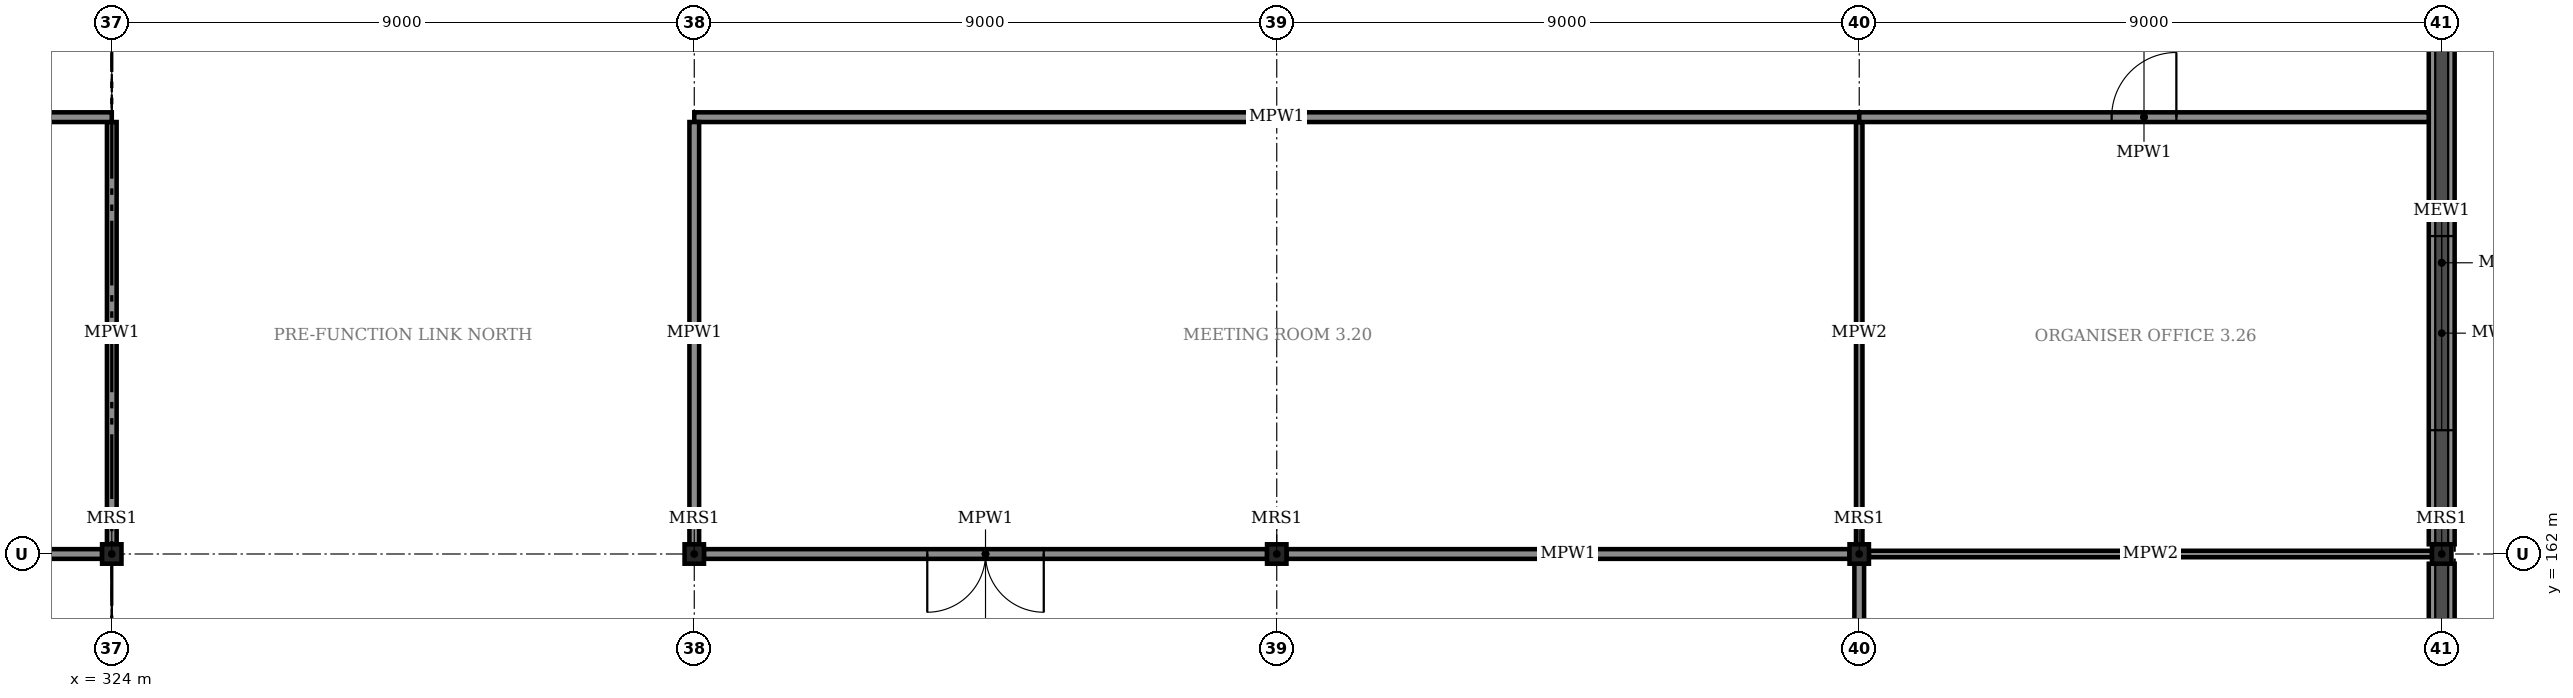
"""IFC4 building model, lengths in metres.
Left out: names, types, materials, properties, quantities, classifications, styles, units other than length and angle.
Written with IfcOpenShell. Run it as: python <this file> out.ifc"""

import sys

from ifc_helpers import new_model, si_unit, direction, frame, frame_2d, origin, origin_2d, place, context, subcontext, project, spatial, rectangle, hollow_rectangle, extrude, element, fill, save


model = new_model("IFC4")
c1 = context("Model", 3, precision=1e-05, world=origin(), true_north=direction((0.0, 1.0)))
c2 = subcontext(c1, "Body", "Model", "MODEL_VIEW")
j1 = project(units=[si_unit("LENGTHUNIT", "METRE"), si_unit("PLANEANGLEUNIT", "RADIAN")], contexts=[c1])
p1 = place(None, origin())
s1 = spatial("IfcSite", under=j1, at=p1, CompositionType="ELEMENT")
p2 = place(p1, origin())
s2 = spatial("IfcBuilding", under=s1, at=p2, CompositionType="ELEMENT")
p3 = place(p2, frame((0.0, 0.0, 17.0)))
s3 = spatial("IfcBuildingStorey", under=s2, at=p3, CompositionType="ELEMENT", Elevation=17.0)
for number, where, z_axis, x_axis in (
    (1, (324.0, 162.0, 0.0), (0.0, 0.0, 1.0), (1.0, 0.0, 0.0)),
    (2, (333.0, 162.0, 0.0), (0.0, 0.0, 1.0), (1.0, 0.0, 0.0)),
    (3, (342.0, 162.0, 0.0), (0.0, 0.0, 1.0), (1.0, 0.0, 0.0)),
    (4, (351.0, 162.0, 0.0), (0.0, 0.0, 1.0), (1.0, 0.0, 0.0)),
    (5, (360.0, 162.0, 0.0), (0.0, 0.0, 1.0), (1.0, 0.0, 0.0)),
):
    element("IfcColumn", number, at=place(p3, frame(where, z_axis=z_axis, x_axis=x_axis)), inside=s3, PredefinedType="COLUMN", context=c2, shape_type="SweptSolid", body=[
        extrude(hollow_rectangle(XDim=0.3, YDim=0.3, WallThickness=0.012, InnerFilletRadius=0.024, OuterFilletRadius=0.036, at=origin_2d()), origin(), (0.0, 0.0, 1.0), 3.1),
    ])
p4 = place(p3, frame((360.0, 153.15, 0.0), z_axis=(0.0, 0.0, 1.0), x_axis=(0.0, 1.0, 0.0)))
e6 = element("IfcWall", 6, at=p4, inside=s3, PredefinedType="STANDARD", context=c2, shape_type="SweptSolid", body=[
    extrude(rectangle(XDim=8.7, YDim=0.4, at=frame_2d((4.35, 0.0))), origin(), (0.0, 0.0, 1.0), 3.3),
])
p5 = place(p4, frame((2.85, 0.0, 0.9)))
e7 = element("IfcOpeningElement", 7, at=p5, cuts=e6, PredefinedType="OPENING", context=c2, shape_type="SweptSolid", body=[
    extrude(rectangle(XDim=3.0, YDim=2.1, at=frame_2d((1.5, 1.05))), frame((0.0, 0.21, 0.0), z_axis=(0.0, -1.0, 0.0), x_axis=(1.0, 0.0, 0.0)), (0.0, 0.0, 1.0), 0.42),
])
p6 = place(p3, frame((360.0, 162.15, 0.0), z_axis=(0.0, 0.0, 1.0), x_axis=(0.0, 1.0, 0.0)))
e8 = element("IfcWall", 8, at=p6, inside=s3, PredefinedType="STANDARD", context=c2, shape_type="SweptSolid", body=[
    extrude(rectangle(XDim=8.7, YDim=0.4, at=frame_2d((4.35, 0.0))), origin(), (0.0, 0.0, 1.0), 3.3),
])
p7 = place(p6, frame((1.763, 0.0, 0.9)))
e9 = element("IfcOpeningElement", 9, at=p7, cuts=e8, PredefinedType="OPENING", context=c2, shape_type="SweptSolid", body=[
    extrude(rectangle(XDim=3.0, YDim=2.1, at=frame_2d((1.5, 1.05))), frame((0.0, 0.21, 0.0), z_axis=(0.0, -1.0, 0.0), x_axis=(1.0, 0.0, 0.0)), (0.0, 0.0, 1.0), 0.42),
])
p8 = place(p3, frame((315.15, 162.0, 0.0), z_axis=(0.0, 0.0, 1.0), x_axis=(1.0, 0.0, 0.0)))
e10 = element("IfcWall", 10, at=p8, inside=s3, PredefinedType="PARTITIONING", context=c2, shape_type="SweptSolid", body=[
    extrude(rectangle(XDim=8.7, YDim=0.15, at=frame_2d((4.35, 0.0))), origin(), (0.0, 0.0, 1.0), 3.0),
])
p9 = place(p3, frame((297.0, 168.75, 0.0), z_axis=(0.0, 0.0, 1.0), x_axis=(1.0, 0.0, 0.0)))
e11 = element("IfcWall", 11, at=p9, inside=s3, PredefinedType="PARTITIONING", context=c2, shape_type="SweptSolid", body=[
    extrude(rectangle(XDim=27.0, YDim=0.15, at=frame_2d((13.5, 0.0))), origin(), (0.0, 0.0, 1.0), 3.0),
])
p10 = place(p3, frame((324.0, 162.15, 0.0), z_axis=(0.0, 0.0, 1.0), x_axis=(0.0, 1.0, 0.0)))
e12 = element("IfcWall", 12, at=p10, inside=s3, PredefinedType="PARTITIONING", context=c2, shape_type="SweptSolid", body=[
    extrude(rectangle(XDim=6.525, YDim=0.15, at=frame_2d((3.263, 0.0))), origin(), (0.0, 0.0, 1.0), 3.0),
])
p11 = place(p3, frame((333.15, 162.0, 0.0), z_axis=(0.0, 0.0, 1.0), x_axis=(1.0, 0.0, 0.0)))
e13 = element("IfcWall", 13, at=p11, inside=s3, PredefinedType="PARTITIONING", context=c2, shape_type="SweptSolid", body=[
    extrude(rectangle(XDim=8.7, YDim=0.15, at=frame_2d((4.35, 0.0))), origin(), (0.0, 0.0, 1.0), 3.0),
])
p12 = place(p11, frame((3.45, 0.0, 0.0)))
e14 = element("IfcOpeningElement", 14, at=p12, cuts=e13, PredefinedType="OPENING", context=c2, shape_type="SweptSolid", body=[
    extrude(rectangle(XDim=1.8, YDim=2.4, at=frame_2d((0.9, 1.2))), frame((0.0, 0.085, 0.0), z_axis=(0.0, -1.0, 0.0), x_axis=(1.0, 0.0, 0.0)), (0.0, 0.0, 1.0), 0.17),
])
p13 = place(p3, frame((342.15, 162.0, 0.0), z_axis=(0.0, 0.0, 1.0), x_axis=(1.0, 0.0, 0.0)))
e15 = element("IfcWall", 15, at=p13, inside=s3, PredefinedType="PARTITIONING", context=c2, shape_type="SweptSolid", body=[
    extrude(rectangle(XDim=8.7, YDim=0.15, at=frame_2d((4.35, 0.0))), origin(), (0.0, 0.0, 1.0), 3.0),
])
p14 = place(p3, frame((333.0, 168.75, 0.0), z_axis=(0.0, 0.0, 1.0), x_axis=(1.0, 0.0, 0.0)))
e16 = element("IfcWall", 16, at=p14, inside=s3, PredefinedType="PARTITIONING", context=c2, shape_type="SweptSolid", body=[
    extrude(rectangle(XDim=18.0, YDim=0.15, at=frame_2d((9.0, 0.0))), origin(), (0.0, 0.0, 1.0), 3.0),
])
p15 = place(p3, frame((333.0, 162.15, 0.0), z_axis=(0.0, 0.0, 1.0), x_axis=(0.0, 1.0, 0.0)))
e17 = element("IfcWall", 17, at=p15, inside=s3, PredefinedType="PARTITIONING", context=c2, shape_type="SweptSolid", body=[
    extrude(rectangle(XDim=6.525, YDim=0.15, at=frame_2d((3.263, 0.0))), origin(), (0.0, 0.0, 1.0), 3.0),
])
p16 = place(p3, frame((351.0, 162.15, 0.0), z_axis=(0.0, 0.0, 1.0), x_axis=(0.0, 1.0, 0.0)))
e18 = element("IfcWall", 18, at=p16, inside=s3, PredefinedType="PARTITIONING", context=c2, shape_type="SweptSolid", body=[
    extrude(rectangle(XDim=6.525, YDim=0.1, at=frame_2d((3.263, 0.0))), origin(), (0.0, 0.0, 1.0), 3.0),
])
p17 = place(p3, frame((351.15, 162.0, 0.0), z_axis=(0.0, 0.0, 1.0), x_axis=(1.0, 0.0, 0.0)))
e19 = element("IfcWall", 19, at=p17, inside=s3, PredefinedType="PARTITIONING", context=c2, shape_type="SweptSolid", body=[
    extrude(rectangle(XDim=8.7, YDim=0.1, at=frame_2d((4.35, 0.0))), origin(), (0.0, 0.0, 1.0), 3.0),
])
p18 = place(p3, frame((351.0, 153.15, 0.0), z_axis=(0.0, 0.0, 1.0), x_axis=(0.0, 1.0, 0.0)))
e20 = element("IfcWall", 20, at=p18, inside=s3, PredefinedType="PARTITIONING", context=c2, shape_type="SweptSolid", body=[
    extrude(rectangle(XDim=8.7, YDim=0.15, at=frame_2d((4.35, 0.0))), origin(), (0.0, 0.0, 1.0), 3.0),
])
p19 = place(p18, frame((3.85, 0.0, 0.0)))
e21 = element("IfcOpeningElement", 21, at=p19, cuts=e20, PredefinedType="OPENING", context=c2, shape_type="SweptSolid", body=[
    extrude(rectangle(XDim=1.0, YDim=2.4, at=frame_2d((0.5, 1.2))), frame((0.0, 0.085, 0.0), z_axis=(0.0, -1.0, 0.0), x_axis=(1.0, 0.0, 0.0)), (0.0, 0.0, 1.0), 0.17),
])
p20 = place(p3, frame((351.0, 168.75, 0.0), z_axis=(0.0, 0.0, 1.0), x_axis=(1.0, 0.0, 0.0)))
e22 = element("IfcWall", 22, at=p20, inside=s3, PredefinedType="PARTITIONING", context=c2, shape_type="SweptSolid", body=[
    extrude(rectangle(XDim=8.8, YDim=0.15, at=frame_2d((4.4, 0.0))), origin(), (0.0, 0.0, 1.0), 3.0),
])
p21 = place(p20, frame((3.9, 0.0, 0.0)))
e23 = element("IfcOpeningElement", 23, at=p21, cuts=e22, PredefinedType="OPENING", context=c2, shape_type="SweptSolid", body=[
    extrude(rectangle(XDim=1.0, YDim=2.4, at=frame_2d((0.5, 1.2))), frame((0.0, 0.085, 0.0), z_axis=(0.0, -1.0, 0.0), x_axis=(1.0, 0.0, 0.0)), (0.0, 0.0, 1.0), 0.17),
])
p22 = place(p7, origin())
e24 = element("IfcWindow", 24, at=p22, inside=s3, PartitioningType="TRIPLE_PANEL_VERTICAL", PredefinedType="WINDOW", context=c2, shape_type="SweptSolid", body=[
    extrude(rectangle(XDim=3.0, YDim=2.1, at=frame_2d((1.5, 1.05))), frame((0.0, 0.03, 0.0), z_axis=(0.0, -1.0, 0.0), x_axis=(1.0, 0.0, 0.0)), (0.0, 0.0, 1.0), 0.06),
])
fill(e9, e24)
p23 = place(p12, frame((1.8, 0.0, 0.0), z_axis=(0.0, 0.0, 1.0), x_axis=(-1.0, 0.0, 0.0)))
e25 = element("IfcDoor", 25, at=p23, inside=s3, OperationType="DOUBLE_DOOR_SINGLE_SWING", PredefinedType="DOOR", context=c2, shape_type="SweptSolid", body=[
    extrude(rectangle(XDim=1.8, YDim=2.4, at=frame_2d((0.9, 1.2))), frame((0.0, 0.025, 0.0), z_axis=(0.0, -1.0, 0.0), x_axis=(1.0, 0.0, 0.0)), (0.0, 0.0, 1.0), 0.05),
])
fill(e14, e25)
p24 = place(p21, origin())
e26 = element("IfcDoor", 26, at=p24, inside=s3, OperationType="SINGLE_SWING_RIGHT", PredefinedType="DOOR", context=c2, shape_type="SweptSolid", body=[
    extrude(rectangle(XDim=1.0, YDim=2.4, at=frame_2d((0.5, 1.2))), frame((0.0, 0.025, 0.0), z_axis=(0.0, -1.0, 0.0), x_axis=(1.0, 0.0, 0.0)), (0.0, 0.0, 1.0), 0.05),
])
fill(e23, e26)
save(model, sys.argv[1])
